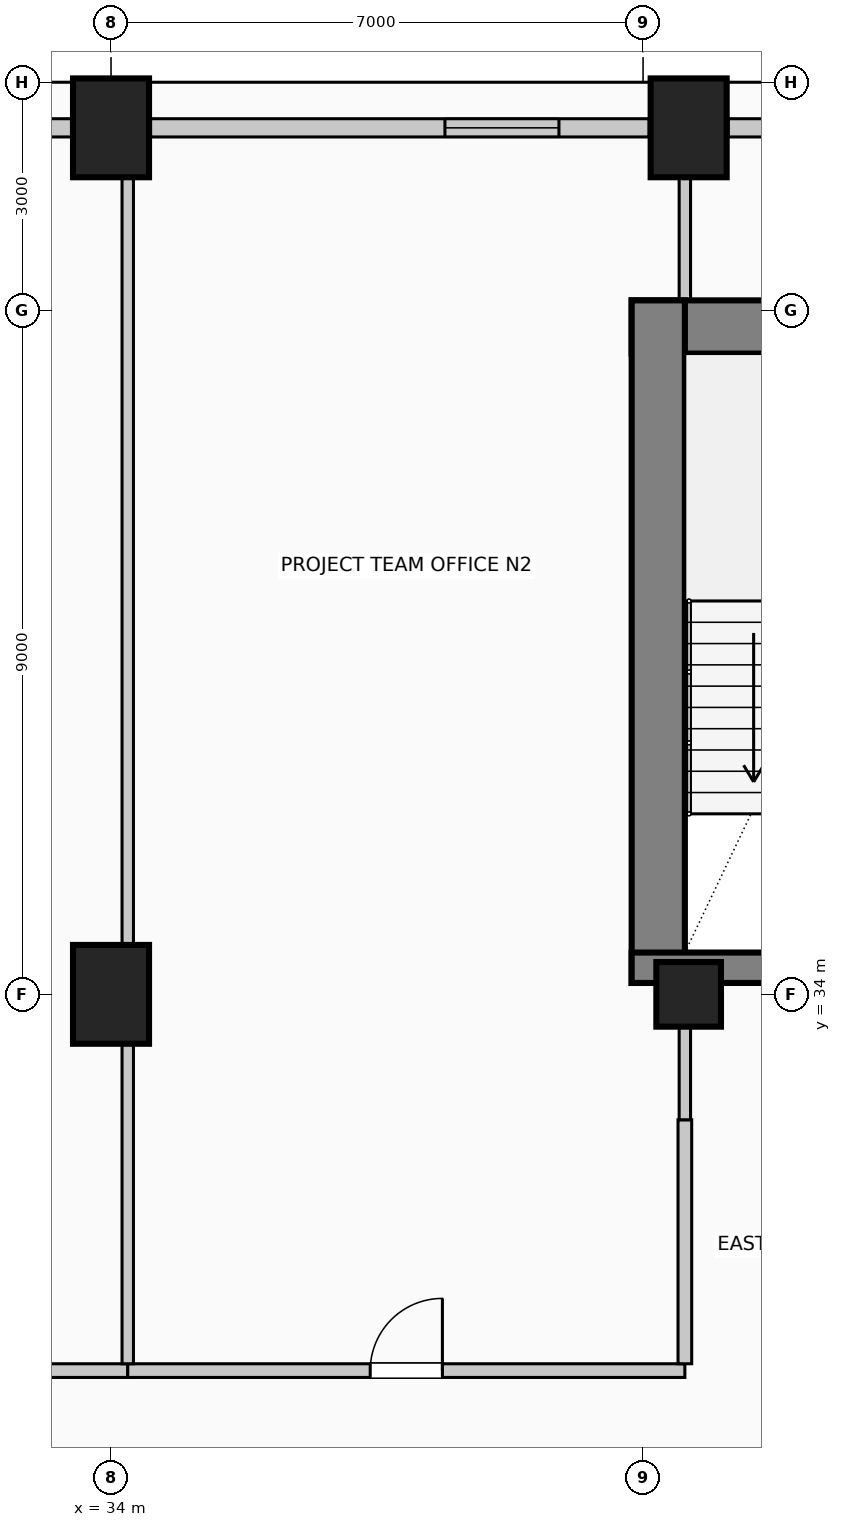
"""IFC4 building model, lengths in metres.
Left out: names, types, materials, properties, quantities, classifications, styles, units other than length and angle.
Written with IfcOpenShell. Run it as: python <this file> out.ifc"""

import sys

from ifc_helpers import new_model, si_unit, direction, frame, frame_2d, origin, origin_2d, place, context, subcontext, project, spatial, rectangle, circle, extrude, element, fill, save


model = new_model("IFC4")
c1 = context("Model", 3, precision=1e-05, world=origin(), true_north=direction((0.0, 1.0)))
c2 = subcontext(c1, "Body", "Model", "MODEL_VIEW")
j1 = project(units=[si_unit("LENGTHUNIT", "METRE"), si_unit("PLANEANGLEUNIT", "RADIAN")], contexts=[c1])
p1 = place(None, origin())
s1 = spatial("IfcSite", under=j1, at=p1, CompositionType="ELEMENT")
p2 = place(p1, origin())
s2 = spatial("IfcBuilding", under=s1, at=p2, CompositionType="ELEMENT")
p3 = place(p2, frame((0.0, 0.0, 202.6)))
s3 = spatial("IfcBuildingStorey", under=s2, at=p3, CompositionType="ELEMENT", Elevation=202.6)
p4 = place(p3, frame((40.85, 42.78, 0.0), z_axis=(0.0, 0.0, 1.0), x_axis=(1.0, 0.0, 0.0)))
e1 = element("IfcWall", 1, at=p4, inside=s3, PredefinedType="SHEAR", context=c2, shape_type="SweptSolid", body=[
    extrude(rectangle(XDim=14.3, YDim=0.7, at=frame_2d((7.15, 0.0))), origin(), (0.0, 0.0, 1.0), 4.0),
])
p5 = place(p3, frame((41.2, 34.15, 0.0), z_axis=(0.0, 0.0, 1.0), x_axis=(0.0, 1.0, 0.0)))
e2 = element("IfcWall", 2, at=p5, inside=s3, PredefinedType="SHEAR", context=c2, shape_type="SweptSolid", body=[
    extrude(rectangle(XDim=8.98, YDim=0.7, at=frame_2d((4.49, 0.0))), origin(), (0.0, 0.0, 1.0), 4.0),
])
p6 = place(p3, frame((40.85, 34.35, 0.0), z_axis=(0.0, 0.0, 1.0), x_axis=(1.0, 0.0, 0.0)))
e3 = element("IfcWall", 3, at=p6, inside=s3, PredefinedType="SHEAR", context=c2, shape_type="SweptSolid", body=[
    extrude(rectangle(XDim=4.86, YDim=0.4, at=frame_2d((2.43, 0.0))), origin(), (0.0, 0.0, 1.0), 4.0),
])
p7 = place(p6, frame((2.4, 0.0, 0.0)))
e4 = element("IfcOpeningElement", 4, at=p7, cuts=e3, PredefinedType="OPENING", context=c2, shape_type="SweptSolid", body=[
    extrude(rectangle(XDim=1.15, YDim=2.2, at=frame_2d((0.575, 1.1))), frame((0.0, 0.21, 0.0), z_axis=(0.0, -1.0, 0.0), x_axis=(1.0, 0.0, 0.0)), (0.0, 0.0, 1.0), 0.42),
])
for number, where, z_axis, x_axis in (
    (5, (34.0, 45.4, 0.0), (0.0, 0.0, 1.0), (1.0, 0.0, 0.0)),
    (6, (41.6, 45.4, 0.0), (0.0, 0.0, 1.0), (1.0, 0.0, 0.0)),
    (7, (34.0, 34.0, 0.0), (0.0, 0.0, 1.0), (1.0, 0.0, 0.0)),
):
    element("IfcColumn", number, at=place(p3, frame(where, z_axis=z_axis, x_axis=x_axis)), inside=s3, PredefinedType="COLUMN", context=c2, shape_type="SweptSolid", body=[
        extrude(rectangle(XDim=1.0, YDim=1.3, at=origin_2d()), origin(), (0.0, 0.0, 1.0), 4.0),
    ])
p8 = place(p3, frame((41.6, 34.0, 0.0), z_axis=(0.0, 0.0, 1.0), x_axis=(1.0, 0.0, 0.0)))
e8 = element("IfcColumn", 8, at=p8, inside=s3, PredefinedType="COLUMN", context=c2, shape_type="SweptSolid", body=[
    extrude(circle(Radius=0.425, at=origin_2d()), origin(), (0.0, 0.0, 1.0), 4.0),
])
p9 = place(p3, frame((29.42, 45.4, 0.0), z_axis=(0.0, 0.0, 1.0), x_axis=(1.0, 0.0, 0.0)))
e9 = element("IfcWall", 9, at=p9, inside=s3, PredefinedType="SOLIDWALL", context=c2, shape_type="SweptSolid", body=[
    extrude(rectangle(XDim=4.06, YDim=0.24, at=frame_2d((2.03, 0.0))), origin(), (0.0, 0.0, 1.0), 3.0),
])
p10 = place(p9, frame((1.28, 0.0, 0.42)))
e10 = element("IfcOpeningElement", 10, at=p10, cuts=e9, PredefinedType="OPENING", context=c2, shape_type="SweptSolid", body=[
    extrude(rectangle(XDim=1.5, YDim=2.2, at=frame_2d((0.75, 1.1))), frame((0.0, 0.13, 0.0), z_axis=(0.0, -1.0, 0.0), x_axis=(1.0, 0.0, 0.0)), (0.0, 0.0, 1.0), 0.26),
])
p11 = place(p3, frame((34.52, 45.4, 0.0), z_axis=(0.0, 0.0, 1.0), x_axis=(1.0, 0.0, 0.0)))
e11 = element("IfcWall", 11, at=p11, inside=s3, PredefinedType="SOLIDWALL", context=c2, shape_type="SweptSolid", body=[
    extrude(rectangle(XDim=6.56, YDim=0.24, at=frame_2d((3.28, 0.0))), origin(), (0.0, 0.0, 1.0), 3.0),
])
p12 = place(p11, frame((3.873, 0.0, 0.42)))
e12 = element("IfcOpeningElement", 12, at=p12, cuts=e11, PredefinedType="OPENING", context=c2, shape_type="SweptSolid", body=[
    extrude(rectangle(XDim=1.5, YDim=2.2, at=frame_2d((0.75, 1.1))), frame((0.0, 0.13, 0.0), z_axis=(0.0, -1.0, 0.0), x_axis=(1.0, 0.0, 0.0)), (0.0, 0.0, 1.0), 0.26),
])
p13 = place(p3, frame((42.12, 45.4, 0.0), z_axis=(0.0, 0.0, 1.0), x_axis=(1.0, 0.0, 0.0)))
e13 = element("IfcWall", 13, at=p13, inside=s3, PredefinedType="SOLIDWALL", context=c2, shape_type="SweptSolid", body=[
    extrude(rectangle(XDim=1.46, YDim=0.24, at=frame_2d((0.73, 0.0))), origin(), (0.0, 0.0, 1.0), 3.0),
])
p14 = place(p3, frame((23.1, 29.05, 0.0), z_axis=(0.0, 0.0, 1.0), x_axis=(1.0, 0.0, 0.0)))
e14 = element("IfcWall", 14, at=p14, inside=s3, PredefinedType="PARTITIONING", context=c2, shape_type="SweptSolid", body=[
    extrude(rectangle(XDim=11.12, YDim=0.18, at=frame_2d((5.56, 0.0))), origin(), (0.0, 0.0, 1.0), 3.75),
])
p15 = place(p14, frame((5.035, 0.0, 0.0)))
e15 = element("IfcOpeningElement", 15, at=p15, cuts=e14, PredefinedType="OPENING", context=c2, shape_type="SweptSolid", body=[
    extrude(rectangle(XDim=1.05, YDim=2.15, at=frame_2d((0.525, 1.075))), frame((0.0, 0.1, 0.0), z_axis=(0.0, -1.0, 0.0), x_axis=(1.0, 0.0, 0.0)), (0.0, 0.0, 1.0), 0.2),
])
p16 = place(p3, frame((34.22, 29.05, 0.0), z_axis=(0.0, 0.0, 1.0), x_axis=(1.0, 0.0, 0.0)))
e16 = element("IfcWall", 16, at=p16, inside=s3, PredefinedType="PARTITIONING", context=c2, shape_type="SweptSolid", body=[
    extrude(rectangle(XDim=7.33, YDim=0.18, at=frame_2d((3.665, 0.0))), origin(), (0.0, 0.0, 1.0), 3.75),
])
p17 = place(p16, frame((3.19, 0.0, 0.0)))
e17 = element("IfcOpeningElement", 17, at=p17, cuts=e16, PredefinedType="OPENING", context=c2, shape_type="SweptSolid", body=[
    extrude(rectangle(XDim=0.95, YDim=2.15, at=frame_2d((0.475, 1.075))), frame((0.0, 0.1, 0.0), z_axis=(0.0, -1.0, 0.0), x_axis=(1.0, 0.0, 0.0)), (0.0, 0.0, 1.0), 0.2),
])
p18 = place(p3, frame((34.22, 29.14, 0.0), z_axis=(0.0, 0.0, 1.0), x_axis=(0.0, 1.0, 0.0)))
e18 = element("IfcWall", 18, at=p18, inside=s3, PredefinedType="PARTITIONING", context=c2, shape_type="SweptSolid", body=[
    extrude(rectangle(XDim=4.21, YDim=0.15, at=frame_2d((2.105, 0.0))), origin(), (0.0, 0.0, 1.0), 3.145),
])
p19 = place(p3, frame((34.22, 34.65, 0.0), z_axis=(0.0, 0.0, 1.0), x_axis=(0.0, 1.0, 0.0)))
e19 = element("IfcWall", 19, at=p19, inside=s3, PredefinedType="PARTITIONING", context=c2, shape_type="SweptSolid", body=[
    extrude(rectangle(XDim=10.1, YDim=0.15, at=frame_2d((5.05, 0.0))), origin(), (0.0, 0.0, 1.0), 3.145),
])
p20 = place(p3, frame((41.55, 29.14, 0.0), z_axis=(0.0, 0.0, 1.0), x_axis=(0.0, 1.0, 0.0)))
e20 = element("IfcWall", 20, at=p20, inside=s3, PredefinedType="PARTITIONING", context=c2, shape_type="SweptSolid", body=[
    extrude(rectangle(XDim=3.21, YDim=0.18, at=frame_2d((1.605, 0.0))), origin(), (0.0, 0.0, 1.0), 3.145),
])
p21 = place(p3, frame((41.55, 32.35, 0.0), z_axis=(0.0, 0.0, 1.0), x_axis=(0.0, 1.0, 0.0)))
e21 = element("IfcWall", 21, at=p21, inside=s3, PredefinedType="PARTITIONING", context=c2, shape_type="SweptSolid", body=[
    extrude(rectangle(XDim=1.225, YDim=0.15, at=frame_2d((0.612, 0.0))), origin(), (0.0, 0.0, 1.0), 3.145),
])
p22 = place(p3, frame((41.55, 43.13, 0.0), z_axis=(0.0, 0.0, 1.0), x_axis=(0.0, 1.0, 0.0)))
e22 = element("IfcWall", 22, at=p22, inside=s3, PredefinedType="PARTITIONING", context=c2, shape_type="SweptSolid", body=[
    extrude(rectangle(XDim=1.62, YDim=0.15, at=frame_2d((0.81, 0.0))), origin(), (0.0, 0.0, 1.0), 3.75),
])
p23 = place(p12, origin())
e23 = element("IfcWindow", 23, at=p23, inside=s3, PartitioningType="SINGLE_PANEL", PredefinedType="WINDOW", context=c2, shape_type="SweptSolid", body=[
    extrude(rectangle(XDim=1.5, YDim=2.2, at=frame_2d((0.75, 1.1))), frame((0.0, 0.03, 0.0), z_axis=(0.0, -1.0, 0.0), x_axis=(1.0, 0.0, 0.0)), (0.0, 0.0, 1.0), 0.06),
])
fill(e12, e23)
p24 = place(p17, origin())
e24 = element("IfcDoor", 24, at=p24, inside=s3, OperationType="SINGLE_SWING_RIGHT", PredefinedType="DOOR", context=c2, shape_type="SweptSolid", body=[
    extrude(rectangle(XDim=0.95, YDim=2.15, at=frame_2d((0.475, 1.075))), frame((0.0, 0.025, 0.0), z_axis=(0.0, -1.0, 0.0), x_axis=(1.0, 0.0, 0.0)), (0.0, 0.0, 1.0), 0.05),
])
fill(e17, e24)
save(model, sys.argv[1])
